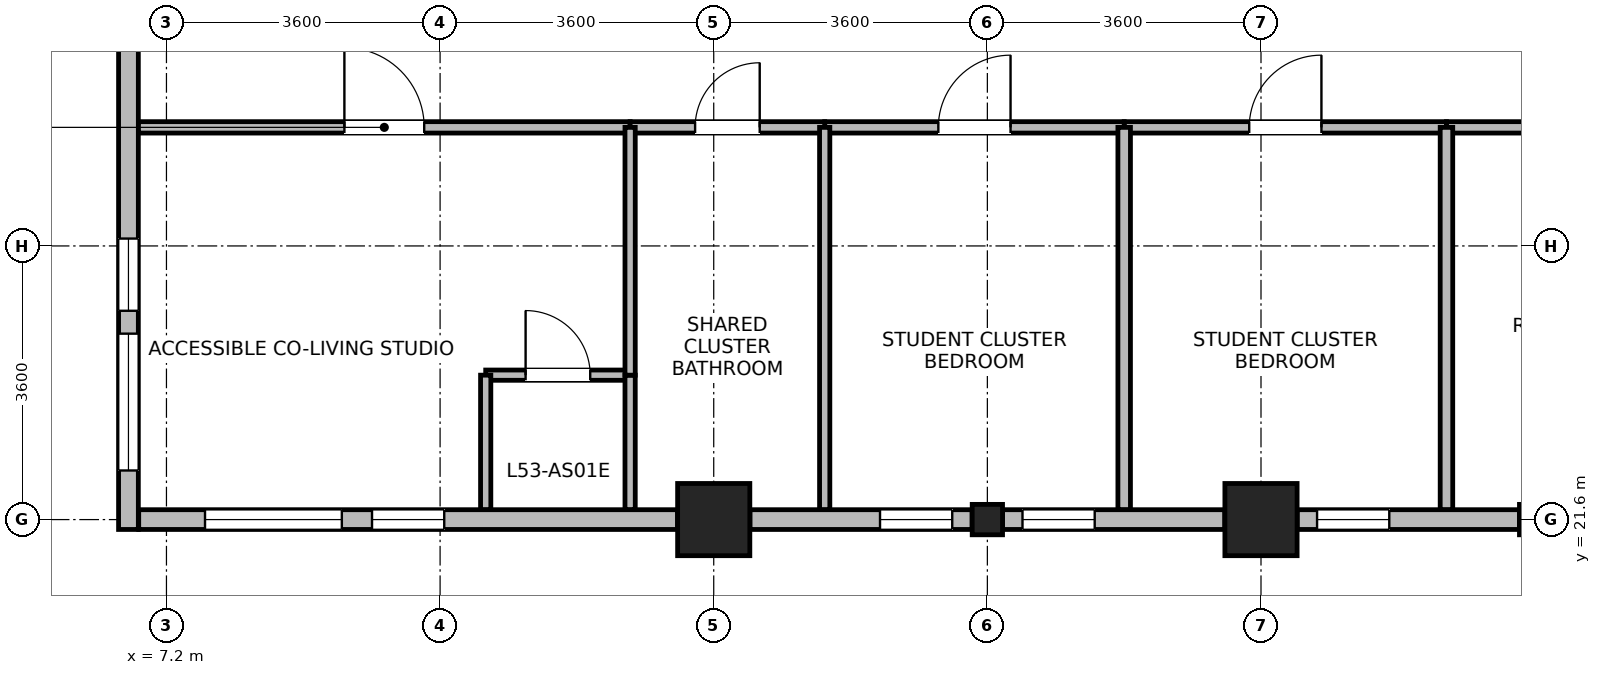
"""IFC4 building model, lengths in metres.
Left out: names, types, materials, properties, quantities, classifications, styles, units other than length and angle.
Written with IfcOpenShell. Run it as: python <this file> out.ifc"""

import sys

from ifc_helpers import new_model, si_unit, direction, frame, frame_2d, origin, origin_2d, place, context, subcontext, project, spatial, rectangle, i_section, extrude, source, transform, mapped, element, fill, save


model = new_model("IFC4")
c1 = context("Model", 3, precision=1e-05, world=origin(), true_north=direction((0.0, 1.0)))
c2 = subcontext(c1, "Body", "Model", "MODEL_VIEW")
j1 = project(units=[si_unit("LENGTHUNIT", "METRE"), si_unit("PLANEANGLEUNIT", "RADIAN")], contexts=[c1])
p1 = place(None, origin())
s1 = spatial("IfcSite", under=j1, at=p1, CompositionType="ELEMENT")
p2 = place(p1, origin())
s2 = spatial("IfcBuilding", under=s1, at=p2, CompositionType="ELEMENT")
p3 = place(p2, frame((0.0, 0.0, 209.2)))
s3 = spatial("IfcBuildingStorey", under=s2, at=p3, CompositionType="ELEMENT", Elevation=209.2)
m1 = source(origin(), c2, "Body", "SweptSolid", [
    extrude(rectangle(XDim=0.95, YDim=0.95, at=origin_2d()), origin(), (0.0, 0.0, 1.0), 3.7),
])
for number, where, z_axis, x_axis in (
    (1, (14.4, 21.6, 0.0), (0.0, 0.0, 1.0), (1.0, 0.0, 0.0)),
    (2, (21.6, 21.6, 0.0), (0.0, 0.0, 1.0), (1.0, 0.0, 0.0)),
):
    element("IfcColumn", number, at=place(p3, frame(where, z_axis=z_axis, x_axis=x_axis)), inside=s3, PredefinedType="COLUMN", context=c2, shape_type="MappedRepresentation", body=[
        mapped(m1, transform((0.0, 0.0, 0.0), x_axis=(1.0, 0.0, 0.0), y_axis=(0.0, 1.0, 0.0), z_axis=(0.0, 0.0, 1.0), scale=1.0)),
    ])
m2 = source(origin(), c2, "Body", "SweptSolid", [
    extrude(i_section(OverallWidth=0.399, OverallDepth=0.4, WebThickness=0.017, FlangeThickness=0.023, FilletRadius=0.015, at=origin_2d()), origin(), (0.0, 0.0, 1.0), 3.7),
])
for number, where, z_axis, x_axis in (
    (3, (18.0, 21.6, 0.0), (0.0, 0.0, 1.0), (1.0, 0.0, 0.0)),
    (4, (25.2, 21.6, 0.0), (0.0, 0.0, 1.0), (1.0, 0.0, 0.0)),
):
    element("IfcColumn", number, at=place(p3, frame(where, z_axis=z_axis, x_axis=x_axis)), inside=s3, PredefinedType="COLUMN", context=c2, shape_type="MappedRepresentation", body=[
        mapped(m2, transform((0.0, 0.0, 0.0), x_axis=(1.0, 0.0, 0.0), y_axis=(0.0, 1.0, 0.0), z_axis=(0.0, 0.0, 1.0), scale=1.0)),
    ])
p4 = place(p3, frame((6.7, 21.47, 0.0), z_axis=(0.0, 0.0, 1.0), x_axis=(0.0, 1.0, 0.0)))
e5 = element("IfcWall", 5, at=p4, inside=s3, PredefinedType="STANDARD", context=c2, shape_type="SweptSolid", body=[
    extrude(rectangle(XDim=6.704, YDim=0.26, at=frame_2d((3.352, 0.0))), origin(), (0.0, 0.0, 1.0), 3.45),
])
p5 = place(p4, frame((0.776, 0.0, 0.85)))
e6 = element("IfcOpeningElement", 6, at=p5, cuts=e5, PredefinedType="OPENING", context=c2, shape_type="SweptSolid", body=[
    extrude(rectangle(XDim=1.8, YDim=1.85, at=frame_2d((0.9, 0.925))), frame((0.0, 0.14, 0.0), z_axis=(0.0, -1.0, 0.0), x_axis=(1.0, 0.0, 0.0)), (0.0, 0.0, 1.0), 0.28),
])
p6 = place(p4, frame((2.877, 0.0, 0.85)))
e7 = element("IfcOpeningElement", 7, at=p6, cuts=e5, PredefinedType="OPENING", context=c2, shape_type="SweptSolid", body=[
    extrude(rectangle(XDim=0.95, YDim=1.75, at=frame_2d((0.475, 0.875))), frame((0.0, 0.14, 0.0), z_axis=(0.0, -1.0, 0.0), x_axis=(1.0, 0.0, 0.0)), (0.0, 0.0, 1.0), 0.28),
])
p7 = place(p3, frame((13.924, 21.6, 0.0), z_axis=(0.0, 0.0, 1.0), x_axis=(-1.0, 0.0, 0.0)))
e8 = element("IfcWall", 8, at=p7, inside=s3, PredefinedType="STANDARD", context=c2, shape_type="SweptSolid", body=[
    extrude(rectangle(XDim=7.089, YDim=0.26, at=frame_2d((3.544, 0.0))), origin(), (0.0, 0.0, 1.0), 3.45),
])
p8 = place(p7, frame((4.417, 0.0, 0.85)))
e9 = element("IfcOpeningElement", 9, at=p8, cuts=e8, PredefinedType="OPENING", context=c2, shape_type="SweptSolid", body=[
    extrude(rectangle(XDim=1.8, YDim=1.85, at=frame_2d((0.9, 0.925))), frame((0.0, 0.14, 0.0), z_axis=(0.0, -1.0, 0.0), x_axis=(1.0, 0.0, 0.0)), (0.0, 0.0, 1.0), 0.28),
])
p9 = place(p7, frame((3.07, 0.0, 0.85)))
e10 = element("IfcOpeningElement", 10, at=p9, cuts=e8, PredefinedType="OPENING", context=c2, shape_type="SweptSolid", body=[
    extrude(rectangle(XDim=0.95, YDim=1.75, at=frame_2d((0.475, 0.875))), frame((0.0, 0.14, 0.0), z_axis=(0.0, -1.0, 0.0), x_axis=(1.0, 0.0, 0.0)), (0.0, 0.0, 1.0), 0.28),
])
p10 = place(p3, frame((17.8, 21.6, 0.0), z_axis=(0.0, 0.0, 1.0), x_axis=(-1.0, 0.0, 0.0)))
e11 = element("IfcWall", 11, at=p10, inside=s3, PredefinedType="STANDARD", context=c2, shape_type="SweptSolid", body=[
    extrude(rectangle(XDim=2.924, YDim=0.26, at=frame_2d((1.462, 0.0))), origin(), (0.0, 0.0, 1.0), 3.0),
])
p11 = place(p10, frame((0.262, 0.0, 0.85)))
e12 = element("IfcOpeningElement", 12, at=p11, cuts=e11, PredefinedType="OPENING", context=c2, shape_type="SweptSolid", body=[
    extrude(rectangle(XDim=0.95, YDim=1.75, at=frame_2d((0.475, 0.875))), frame((0.0, 0.14, 0.0), z_axis=(0.0, -1.0, 0.0), x_axis=(1.0, 0.0, 0.0)), (0.0, 0.0, 1.0), 0.28),
])
p12 = place(p3, frame((21.124, 21.6, 0.0), z_axis=(0.0, 0.0, 1.0), x_axis=(-1.0, 0.0, 0.0)))
e13 = element("IfcWall", 13, at=p12, inside=s3, PredefinedType="STANDARD", context=c2, shape_type="SweptSolid", body=[
    extrude(rectangle(XDim=2.924, YDim=0.26, at=frame_2d((1.462, 0.0))), origin(), (0.0, 0.0, 1.0), 3.0),
])
p13 = place(p12, frame((1.712, 0.0, 0.85)))
e14 = element("IfcOpeningElement", 14, at=p13, cuts=e13, PredefinedType="OPENING", context=c2, shape_type="SweptSolid", body=[
    extrude(rectangle(XDim=0.95, YDim=1.75, at=frame_2d((0.475, 0.875))), frame((0.0, 0.14, 0.0), z_axis=(0.0, -1.0, 0.0), x_axis=(1.0, 0.0, 0.0)), (0.0, 0.0, 1.0), 0.28),
])
p14 = place(p3, frame((25.0, 21.6, 0.0), z_axis=(0.0, 0.0, 1.0), x_axis=(-1.0, 0.0, 0.0)))
e15 = element("IfcWall", 15, at=p14, inside=s3, PredefinedType="STANDARD", context=c2, shape_type="SweptSolid", body=[
    extrude(rectangle(XDim=2.924, YDim=0.26, at=frame_2d((1.462, 0.0))), origin(), (0.0, 0.0, 1.0), 3.0),
])
p15 = place(p14, frame((1.712, 0.0, 0.85)))
e16 = element("IfcOpeningElement", 16, at=p15, cuts=e15, PredefinedType="OPENING", context=c2, shape_type="SweptSolid", body=[
    extrude(rectangle(XDim=0.95, YDim=1.75, at=frame_2d((0.475, 0.875))), frame((0.0, 0.14, 0.0), z_axis=(0.0, -1.0, 0.0), x_axis=(1.0, 0.0, 0.0)), (0.0, 0.0, 1.0), 0.28),
])
p16 = place(p3, frame((11.4, 23.5, 0.0), z_axis=(0.0, 0.0, 1.0), x_axis=(1.0, 0.0, 0.0)))
e17 = element("IfcWall", 17, at=p16, inside=s3, PredefinedType="PARTITIONING", context=c2, shape_type="SweptSolid", body=[
    extrude(rectangle(XDim=1.9, YDim=0.135, at=frame_2d((0.95, 0.0))), origin(), (0.0, 0.0, 1.0), 3.45),
])
p17 = place(p16, frame((0.525, 0.0, 0.0)))
e18 = element("IfcOpeningElement", 18, at=p17, cuts=e17, PredefinedType="OPENING", context=c2, shape_type="SweptSolid", body=[
    extrude(rectangle(XDim=0.85, YDim=2.04, at=frame_2d((0.425, 1.02))), frame((0.0, 0.078, 0.0), z_axis=(0.0, -1.0, 0.0), x_axis=(1.0, 0.0, 0.0)), (0.0, 0.0, 1.0), 0.155),
])
for number, where, z_axis, x_axis in (
    (19, (11.4, 21.732, 0.0), (0.0, 0.0, 1.0), (0.0, 1.0, 0.0)),
    (20, (13.3, 21.732, 0.0), (0.0, 0.0, 1.0), (0.0, 1.0, 0.0)),
):
    element("IfcWall", number, at=place(p3, frame(where, z_axis=z_axis, x_axis=x_axis)), inside=s3, PredefinedType="PARTITIONING", context=c2, shape_type="SweptSolid", body=[
        extrude(rectangle(XDim=1.768, YDim=0.135, at=frame_2d((0.884, 0.0))), origin(), (0.0, 0.0, 1.0), 3.45),
    ])
p18 = place(p3, frame((24.04, 26.76, 0.0), z_axis=(0.0, 0.0, 1.0), x_axis=(1.0, 0.0, 0.0)))
e21 = element("IfcWall", 21, at=p18, inside=s3, PredefinedType="PARTITIONING", context=c2, shape_type="SweptSolid", body=[
    extrude(rectangle(XDim=9.32, YDim=0.15, at=frame_2d((4.66, 0.0))), origin(), (0.0, 0.0, 1.0), 3.45),
])
p19 = place(p18, frame((4.01, 0.0, 0.0)))
e22 = element("IfcOpeningElement", 22, at=p19, cuts=e21, PredefinedType="OPENING", context=c2, shape_type="SweptSolid", body=[
    extrude(rectangle(XDim=1.3, YDim=2.12, at=frame_2d((0.65, 1.06))), frame((0.0, 0.085, 0.0), z_axis=(0.0, -1.0, 0.0), x_axis=(1.0, 0.0, 0.0)), (0.0, 0.0, 1.0), 0.17),
])
p20 = place(p3, frame((6.832, 26.76, 0.0), z_axis=(0.0, 0.0, 1.0), x_axis=(1.0, 0.0, 0.0)))
e23 = element("IfcWall", 23, at=p20, inside=s3, PredefinedType="PARTITIONING", context=c2, shape_type="SweptSolid", body=[
    extrude(rectangle(XDim=6.468, YDim=0.15, at=frame_2d((3.234, 0.0))), origin(), (0.0, 0.0, 1.0), 3.45),
])
p21 = place(p20, frame((2.709, 0.0, 0.0)))
e24 = element("IfcOpeningElement", 24, at=p21, cuts=e23, PredefinedType="OPENING", context=c2, shape_type="SweptSolid", body=[
    extrude(rectangle(XDim=1.05, YDim=2.12, at=frame_2d((0.525, 1.06))), frame((0.0, 0.085, 0.0), z_axis=(0.0, -1.0, 0.0), x_axis=(1.0, 0.0, 0.0)), (0.0, 0.0, 1.0), 0.17),
])
p22 = place(p3, frame((19.8, 26.76, 0.0), z_axis=(0.0, 0.0, 1.0), x_axis=(1.0, 0.0, 0.0)))
e25 = element("IfcWall", 25, at=p22, inside=s3, PredefinedType="PARTITIONING", context=c2, shape_type="SweptSolid", body=[
    extrude(rectangle(XDim=4.24, YDim=0.15, at=frame_2d((2.12, 0.0))), origin(), (0.0, 0.0, 1.0), 3.45),
])
p23 = place(p22, frame((1.645, 0.0, 0.0)))
e26 = element("IfcOpeningElement", 26, at=p23, cuts=e25, PredefinedType="OPENING", context=c2, shape_type="SweptSolid", body=[
    extrude(rectangle(XDim=0.95, YDim=2.1, at=frame_2d((0.475, 1.05))), frame((0.0, 0.085, 0.0), z_axis=(0.0, -1.0, 0.0), x_axis=(1.0, 0.0, 0.0)), (0.0, 0.0, 1.0), 0.17),
])
p24 = place(p3, frame((15.86, 26.76, 0.0), z_axis=(0.0, 0.0, 1.0), x_axis=(1.0, 0.0, 0.0)))
e27 = element("IfcWall", 27, at=p24, inside=s3, PredefinedType="PARTITIONING", context=c2, shape_type="SweptSolid", body=[
    extrude(rectangle(XDim=3.94, YDim=0.15, at=frame_2d((1.97, 0.0))), origin(), (0.0, 0.0, 1.0), 3.45),
])
p25 = place(p24, frame((1.495, 0.0, 0.0)))
e28 = element("IfcOpeningElement", 28, at=p25, cuts=e27, PredefinedType="OPENING", context=c2, shape_type="SweptSolid", body=[
    extrude(rectangle(XDim=0.95, YDim=2.1, at=frame_2d((0.475, 1.05))), frame((0.0, 0.085, 0.0), z_axis=(0.0, -1.0, 0.0), x_axis=(1.0, 0.0, 0.0)), (0.0, 0.0, 1.0), 0.17),
])
p26 = place(p3, frame((13.3, 26.76, 0.0), z_axis=(0.0, 0.0, 1.0), x_axis=(1.0, 0.0, 0.0)))
e29 = element("IfcWall", 29, at=p26, inside=s3, PredefinedType="PARTITIONING", context=c2, shape_type="SweptSolid", body=[
    extrude(rectangle(XDim=2.56, YDim=0.15, at=frame_2d((1.28, 0.0))), origin(), (0.0, 0.0, 1.0), 3.45),
])
p27 = place(p26, frame((0.855, 0.0, 0.0)))
e30 = element("IfcOpeningElement", 30, at=p27, cuts=e29, PredefinedType="OPENING", context=c2, shape_type="SweptSolid", body=[
    extrude(rectangle(XDim=0.85, YDim=2.04, at=frame_2d((0.425, 1.02))), frame((0.0, 0.085, 0.0), z_axis=(0.0, -1.0, 0.0), x_axis=(1.0, 0.0, 0.0)), (0.0, 0.0, 1.0), 0.17),
])
p28 = place(p3, frame((15.86, 21.732, 0.0), z_axis=(0.0, 0.0, 1.0), x_axis=(0.0, 1.0, 0.0)))
e31 = element("IfcWall", 31, at=p28, inside=s3, PredefinedType="PARTITIONING", context=c2, shape_type="SweptSolid", body=[
    extrude(rectangle(XDim=5.028, YDim=0.135, at=frame_2d((2.514, 0.0))), origin(), (0.0, 0.0, 1.0), 3.45),
])
for number, where, z_axis, x_axis in (
    (32, (19.8, 21.732, 0.0), (0.0, 0.0, 1.0), (0.0, 1.0, 0.0)),
    (33, (24.04, 21.732, 0.0), (0.0, 0.0, 1.0), (0.0, 1.0, 0.0)),
):
    element("IfcWall", number, at=place(p3, frame(where, z_axis=z_axis, x_axis=x_axis)), inside=s3, PredefinedType="PARTITIONING", context=c2, shape_type="SweptSolid", body=[
        extrude(rectangle(XDim=5.028, YDim=0.165, at=frame_2d((2.514, 0.0))), origin(), (0.0, 0.0, 1.0), 3.45),
    ])
p29 = place(p3, frame((13.3, 23.5, 0.0), z_axis=(0.0, 0.0, 1.0), x_axis=(0.0, 1.0, 0.0)))
e34 = element("IfcWall", 34, at=p29, inside=s3, PredefinedType="PARTITIONING", context=c2, shape_type="SweptSolid", body=[
    extrude(rectangle(XDim=3.26, YDim=0.135, at=frame_2d((1.63, 0.0))), origin(), (0.0, 0.0, 1.0), 3.45),
])
p30 = place(p5, origin())
e35 = element("IfcWindow", 35, at=p30, inside=s3, PartitioningType="SINGLE_PANEL", PredefinedType="WINDOW", context=c2, shape_type="SweptSolid", body=[
    extrude(rectangle(XDim=1.8, YDim=1.85, at=frame_2d((0.9, 0.925))), frame((0.0, 0.03, 0.0), z_axis=(0.0, -1.0, 0.0), x_axis=(1.0, 0.0, 0.0)), (0.0, 0.0, 1.0), 0.06),
])
fill(e6, e35)
p31 = place(p6, origin())
e36 = element("IfcWindow", 36, at=p31, inside=s3, PartitioningType="SINGLE_PANEL", PredefinedType="WINDOW", context=c2, shape_type="SweptSolid", body=[
    extrude(rectangle(XDim=0.95, YDim=1.75, at=frame_2d((0.475, 0.875))), frame((0.0, 0.03, 0.0), z_axis=(0.0, -1.0, 0.0), x_axis=(1.0, 0.0, 0.0)), (0.0, 0.0, 1.0), 0.06),
])
fill(e7, e36)
p32 = place(p8, origin())
e37 = element("IfcWindow", 37, at=p32, inside=s3, PartitioningType="SINGLE_PANEL", PredefinedType="WINDOW", context=c2, shape_type="SweptSolid", body=[
    extrude(rectangle(XDim=1.8, YDim=1.85, at=frame_2d((0.9, 0.925))), frame((0.0, 0.03, 0.0), z_axis=(0.0, -1.0, 0.0), x_axis=(1.0, 0.0, 0.0)), (0.0, 0.0, 1.0), 0.06),
])
fill(e9, e37)
p33 = place(p9, origin())
e38 = element("IfcWindow", 38, at=p33, inside=s3, PartitioningType="SINGLE_PANEL", PredefinedType="WINDOW", context=c2, shape_type="SweptSolid", body=[
    extrude(rectangle(XDim=0.95, YDim=1.75, at=frame_2d((0.475, 0.875))), frame((0.0, 0.03, 0.0), z_axis=(0.0, -1.0, 0.0), x_axis=(1.0, 0.0, 0.0)), (0.0, 0.0, 1.0), 0.06),
])
fill(e10, e38)
p34 = place(p11, origin())
e39 = element("IfcWindow", 39, at=p34, inside=s3, PartitioningType="SINGLE_PANEL", PredefinedType="WINDOW", context=c2, shape_type="SweptSolid", body=[
    extrude(rectangle(XDim=0.95, YDim=1.75, at=frame_2d((0.475, 0.875))), frame((0.0, 0.03, 0.0), z_axis=(0.0, -1.0, 0.0), x_axis=(1.0, 0.0, 0.0)), (0.0, 0.0, 1.0), 0.06),
])
fill(e12, e39)
p35 = place(p13, origin())
e40 = element("IfcWindow", 40, at=p35, inside=s3, PartitioningType="SINGLE_PANEL", PredefinedType="WINDOW", context=c2, shape_type="SweptSolid", body=[
    extrude(rectangle(XDim=0.95, YDim=1.75, at=frame_2d((0.475, 0.875))), frame((0.0, 0.03, 0.0), z_axis=(0.0, -1.0, 0.0), x_axis=(1.0, 0.0, 0.0)), (0.0, 0.0, 1.0), 0.06),
])
fill(e14, e40)
p36 = place(p15, origin())
e41 = element("IfcWindow", 41, at=p36, inside=s3, PartitioningType="SINGLE_PANEL", PredefinedType="WINDOW", context=c2, shape_type="SweptSolid", body=[
    extrude(rectangle(XDim=0.95, YDim=1.75, at=frame_2d((0.475, 0.875))), frame((0.0, 0.03, 0.0), z_axis=(0.0, -1.0, 0.0), x_axis=(1.0, 0.0, 0.0)), (0.0, 0.0, 1.0), 0.06),
])
fill(e16, e41)
p37 = place(p17, origin())
e42 = element("IfcDoor", 42, at=p37, inside=s3, OperationType="SINGLE_SWING_LEFT", PredefinedType="DOOR", context=c2, shape_type="SweptSolid", body=[
    extrude(rectangle(XDim=0.85, YDim=2.04, at=frame_2d((0.425, 1.02))), frame((0.0, 0.025, 0.0), z_axis=(0.0, -1.0, 0.0), x_axis=(1.0, 0.0, 0.0)), (0.0, 0.0, 1.0), 0.05),
])
fill(e18, e42)
p38 = place(p21, origin())
e43 = element("IfcDoor", 43, at=p38, inside=s3, OperationType="SINGLE_SWING_LEFT", PredefinedType="DOOR", context=c2, shape_type="SweptSolid", body=[
    extrude(rectangle(XDim=1.05, YDim=2.12, at=frame_2d((0.525, 1.06))), frame((0.0, 0.025, 0.0), z_axis=(0.0, -1.0, 0.0), x_axis=(1.0, 0.0, 0.0)), (0.0, 0.0, 1.0), 0.05),
])
fill(e24, e43)
p39 = place(p23, origin())
e44 = element("IfcDoor", 44, at=p39, inside=s3, OperationType="SINGLE_SWING_RIGHT", PredefinedType="DOOR", context=c2, shape_type="SweptSolid", body=[
    extrude(rectangle(XDim=0.95, YDim=2.1, at=frame_2d((0.475, 1.05))), frame((0.0, 0.025, 0.0), z_axis=(0.0, -1.0, 0.0), x_axis=(1.0, 0.0, 0.0)), (0.0, 0.0, 1.0), 0.05),
])
fill(e26, e44)
p40 = place(p25, origin())
e45 = element("IfcDoor", 45, at=p40, inside=s3, OperationType="SINGLE_SWING_RIGHT", PredefinedType="DOOR", context=c2, shape_type="SweptSolid", body=[
    extrude(rectangle(XDim=0.95, YDim=2.1, at=frame_2d((0.475, 1.05))), frame((0.0, 0.025, 0.0), z_axis=(0.0, -1.0, 0.0), x_axis=(1.0, 0.0, 0.0)), (0.0, 0.0, 1.0), 0.05),
])
fill(e28, e45)
p41 = place(p27, origin())
e46 = element("IfcDoor", 46, at=p41, inside=s3, OperationType="SINGLE_SWING_RIGHT", PredefinedType="DOOR", context=c2, shape_type="SweptSolid", body=[
    extrude(rectangle(XDim=0.85, YDim=2.04, at=frame_2d((0.425, 1.02))), frame((0.0, 0.025, 0.0), z_axis=(0.0, -1.0, 0.0), x_axis=(1.0, 0.0, 0.0)), (0.0, 0.0, 1.0), 0.05),
])
fill(e30, e46)
save(model, sys.argv[1])
